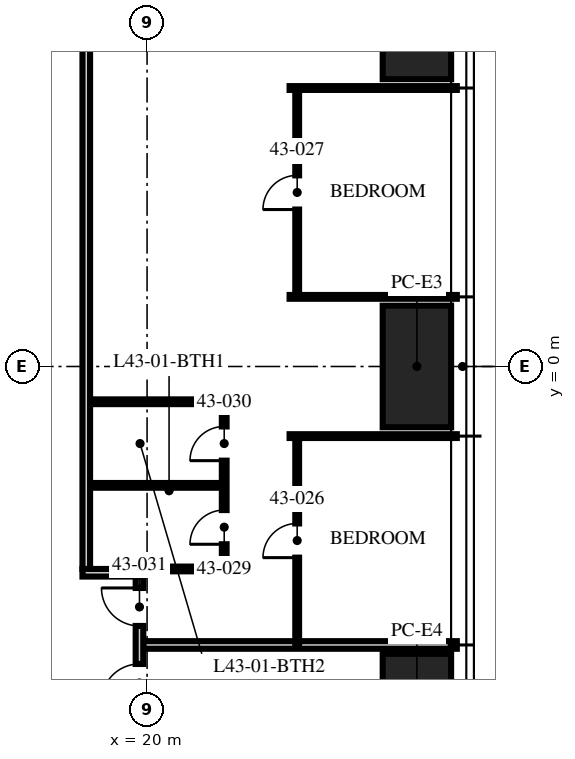
"""IFC4 building model, lengths in metres.
Left out: names, types, materials, properties, quantities, classifications, styles, units other than length and angle.
Written with IfcOpenShell. Run it as: python <this file> out.ifc"""

import sys

from ifc_helpers import new_model, si_unit, direction, frame, frame_2d, origin, origin_2d, place, context, subcontext, project, spatial, rectangle, hollow_rectangle, extrude, element, fill, save


model = new_model("IFC4")
c1 = context("Model", 3, precision=1e-05, world=origin(), true_north=direction((0.0, 1.0)))
c2 = subcontext(c1, "Body", "Model", "MODEL_VIEW")
j1 = project(units=[si_unit("LENGTHUNIT", "METRE"), si_unit("PLANEANGLEUNIT", "RADIAN")], contexts=[c1])
p1 = place(None, origin())
s1 = spatial("IfcSite", under=j1, at=p1, CompositionType="ELEMENT")
p2 = place(p1, origin())
s2 = spatial("IfcBuilding", under=s1, at=p2, CompositionType="ELEMENT")
p3 = place(p2, frame((0.0, 0.0, 171.0)))
s3 = spatial("IfcBuildingStorey", under=s2, at=p3, CompositionType="ELEMENT", Elevation=171.0)
for number, where, z_axis, x_axis in (
    (1, (27.1, 9.16, 0.0), (0.0, 0.0, 1.0), (0.0, 1.0, 0.0)),
    (2, (27.1, 0.0, 0.0), (0.0, 0.0, 1.0), (0.0, 1.0, 0.0)),
    (3, (27.1, -9.16, 0.0), (0.0, 0.0, 1.0), (0.0, 1.0, 0.0)),
):
    element("IfcColumn", number, at=place(p3, frame(where, z_axis=z_axis, x_axis=x_axis)), inside=s3, PredefinedType="COLUMN", context=c2, shape_type="SweptSolid", body=[
        extrude(hollow_rectangle(XDim=3.2, YDim=1.8, WallThickness=0.2, at=origin_2d()), origin(), (0.0, 0.0, 1.0), 3.75),
    ])
p4 = place(p3, frame((19.9, -7.328, 0.0), z_axis=(0.0, 0.0, 1.0), x_axis=(1.0, 0.0, 0.0)))
e4 = element("IfcWall", 4, at=p4, inside=s3, PredefinedType="PARTITIONING", context=c2, shape_type="SweptSolid", body=[
    extrude(rectangle(XDim=8.25, YDim=0.2, at=frame_2d((4.125, 0.0))), origin(), (0.0, 0.0, 1.0), 2.81),
])
for number, where, z_axis, x_axis in (
    (5, (23.75, -1.832, 0.0), (0.0, 0.0, 1.0), (1.0, 0.0, 0.0)),
    (6, (23.75, 1.832, 0.0), (0.0, 0.0, 1.0), (1.0, 0.0, 0.0)),
    (7, (23.75, 7.328, 0.0), (0.0, 0.0, 1.0), (1.0, 0.0, 0.0)),
):
    element("IfcWall", number, at=place(p3, frame(where, z_axis=z_axis, x_axis=x_axis)), inside=s3, PredefinedType="PARTITIONING", context=c2, shape_type="SweptSolid", body=[
        extrude(rectangle(XDim=4.4, YDim=0.1, at=frame_2d((2.2, 0.0))), origin(), (0.0, 0.0, 1.0), 2.81),
    ])
p5 = place(p3, frame((23.95, -7.328, 0.0), z_axis=(0.0, 0.0, 1.0), x_axis=(0.0, 1.0, 0.0)))
e8 = element("IfcWall", 8, at=p5, inside=s3, PredefinedType="PARTITIONING", context=c2, shape_type="SweptSolid", body=[
    extrude(rectangle(XDim=5.496, YDim=0.1, at=frame_2d((2.748, 0.0))), origin(), (0.0, 0.0, 1.0), 2.81),
])
p6 = place(p5, frame((2.298, 0.0, 0.0)))
e9 = element("IfcOpeningElement", 9, at=p6, cuts=e8, PredefinedType="OPENING", context=c2, shape_type="SweptSolid", body=[
    extrude(rectangle(XDim=0.9, YDim=2.1, at=frame_2d((0.45, 1.05))), frame((0.0, 0.06, 0.0), z_axis=(0.0, -1.0, 0.0), x_axis=(1.0, 0.0, 0.0)), (0.0, 0.0, 1.0), 0.12),
])
p7 = place(p3, frame((23.95, 1.832, 0.0), z_axis=(0.0, 0.0, 1.0), x_axis=(0.0, 1.0, 0.0)))
e10 = element("IfcWall", 10, at=p7, inside=s3, PredefinedType="PARTITIONING", context=c2, shape_type="SweptSolid", body=[
    extrude(rectangle(XDim=5.496, YDim=0.1, at=frame_2d((2.748, 0.0))), origin(), (0.0, 0.0, 1.0), 2.81),
])
p8 = place(p7, frame((2.298, 0.0, 0.0)))
e11 = element("IfcOpeningElement", 11, at=p8, cuts=e10, PredefinedType="OPENING", context=c2, shape_type="SweptSolid", body=[
    extrude(rectangle(XDim=0.9, YDim=2.1, at=frame_2d((0.45, 1.05))), frame((0.0, 0.06, 0.0), z_axis=(0.0, -1.0, 0.0), x_axis=(1.0, 0.0, 0.0)), (0.0, 0.0, 1.0), 0.12),
])
p9 = place(p3, frame((22.03, -5.328, 0.0), z_axis=(0.0, 0.0, 1.0), x_axis=(0.0, 1.0, 0.0)))
e12 = element("IfcWall", 12, at=p9, inside=s3, PredefinedType="PARTITIONING", context=c2, shape_type="SweptSolid", body=[
    extrude(rectangle(XDim=4.4, YDim=0.125, at=frame_2d((2.2, 0.0))), origin(), (0.0, 0.0, 1.0), 2.81),
])
p10 = place(p9, frame((0.65, 0.0, 0.0)))
e13 = element("IfcOpeningElement", 13, at=p10, cuts=e12, PredefinedType="OPENING", context=c2, shape_type="SweptSolid", body=[
    extrude(rectangle(XDim=0.9, YDim=2.1, at=frame_2d((0.45, 1.05))), frame((0.0, 0.073, 0.0), z_axis=(0.0, -1.0, 0.0), x_axis=(1.0, 0.0, 0.0)), (0.0, 0.0, 1.0), 0.145),
])
p11 = place(p9, frame((2.85, 0.0, 0.0)))
e14 = element("IfcOpeningElement", 14, at=p11, cuts=e12, PredefinedType="OPENING", context=c2, shape_type="SweptSolid", body=[
    extrude(rectangle(XDim=0.9, YDim=2.1, at=frame_2d((0.45, 1.05))), frame((0.0, 0.073, 0.0), z_axis=(0.0, -1.0, 0.0), x_axis=(1.0, 0.0, 0.0)), (0.0, 0.0, 1.0), 0.145),
])
p12 = place(p3, frame((19.97, -5.328, 0.0), z_axis=(0.0, 0.0, 1.0), x_axis=(1.0, 0.0, 0.0)))
e15 = element("IfcWall", 15, at=p12, inside=s3, PredefinedType="PARTITIONING", context=c2, shape_type="SweptSolid", body=[
    extrude(rectangle(XDim=2.06, YDim=0.125, at=frame_2d((1.03, 0.0))), origin(), (0.0, 0.0, 1.0), 3.5),
])
for number, where, z_axis, x_axis in (
    (16, (18.5, -3.128, 0.0), (0.0, 0.0, 1.0), (1.0, 0.0, 0.0)),
    (17, (18.5, -0.928, 0.0), (0.0, 0.0, 1.0), (1.0, 0.0, 0.0)),
):
    element("IfcWall", number, at=place(p3, frame(where, z_axis=z_axis, x_axis=x_axis)), inside=s3, PredefinedType="PARTITIONING", context=c2, shape_type="SweptSolid", body=[
        extrude(rectangle(XDim=3.53, YDim=0.125, at=frame_2d((1.765, 0.0))), origin(), (0.0, 0.0, 1.0), 3.5),
    ])
p13 = place(p3, frame((18.3, -5.428, 0.0), z_axis=(0.0, 0.0, 1.0), x_axis=(1.0, 0.0, 0.0)))
e18 = element("IfcWall", 18, at=p13, inside=s3, PredefinedType="PARTITIONING", context=c2, shape_type="SweptSolid", body=[
    extrude(rectangle(XDim=1.6, YDim=0.2, at=frame_2d((0.8, 0.0))), origin(), (0.0, 0.0, 1.0), 3.5),
])
p14 = place(p3, frame((19.8, -9.128, 0.0), z_axis=(0.0, 0.0, 1.0), x_axis=(0.0, 1.0, 0.0)))
e19 = element("IfcWall", 19, at=p14, inside=s3, PredefinedType="PARTITIONING", context=c2, shape_type="SweptSolid", body=[
    extrude(rectangle(XDim=3.6, YDim=0.2, at=frame_2d((1.8, 0.0))), origin(), (0.0, 0.0, 1.0), 2.7),
])
p15 = place(p14, frame((2.3, 0.0, 0.0)))
e20 = element("IfcOpeningElement", 20, at=p15, cuts=e19, PredefinedType="OPENING", context=c2, shape_type="SweptSolid", body=[
    extrude(rectangle(XDim=1.0, YDim=2.2, at=frame_2d((0.5, 1.1))), frame((0.0, 0.11, 0.0), z_axis=(0.0, -1.0, 0.0), x_axis=(1.0, 0.0, 0.0)), (0.0, 0.0, 1.0), 0.22),
])
p16 = place(p14, frame((0.3, 0.0, 0.0)))
e21 = element("IfcOpeningElement", 21, at=p16, cuts=e19, PredefinedType="OPENING", context=c2, shape_type="SweptSolid", body=[
    extrude(rectangle(XDim=1.0, YDim=2.2, at=frame_2d((0.5, 1.1))), frame((0.0, 0.11, 0.0), z_axis=(0.0, -1.0, 0.0), x_axis=(1.0, 0.0, 0.0)), (0.0, 0.0, 1.0), 0.22),
])
p17 = place(p3, frame((18.4, -5.328, 0.0), z_axis=(0.0, 0.0, 1.0), x_axis=(0.0, 1.0, 0.0)))
e22 = element("IfcWall", 22, at=p17, inside=s3, PredefinedType="PARTITIONING", context=c2, shape_type="SweptSolid", body=[
    extrude(rectangle(XDim=22.028, YDim=0.2, at=frame_2d((11.014, 0.0))), origin(), (0.0, 0.0, 1.0), 2.7),
])
p18 = place(p6, origin())
e23 = element("IfcDoor", 23, at=p18, inside=s3, OperationType="SINGLE_SWING_LEFT", PredefinedType="DOOR", context=c2, shape_type="SweptSolid", body=[
    extrude(rectangle(XDim=0.9, YDim=2.1, at=frame_2d((0.45, 1.05))), frame((0.0, 0.025, 0.0), z_axis=(0.0, -1.0, 0.0), x_axis=(1.0, 0.0, 0.0)), (0.0, 0.0, 1.0), 0.05),
])
fill(e9, e23)
p19 = place(p8, origin())
e24 = element("IfcDoor", 24, at=p19, inside=s3, OperationType="SINGLE_SWING_LEFT", PredefinedType="DOOR", context=c2, shape_type="SweptSolid", body=[
    extrude(rectangle(XDim=0.9, YDim=2.1, at=frame_2d((0.45, 1.05))), frame((0.0, 0.025, 0.0), z_axis=(0.0, -1.0, 0.0), x_axis=(1.0, 0.0, 0.0)), (0.0, 0.0, 1.0), 0.05),
])
fill(e11, e24)
p20 = place(p10, origin())
e25 = element("IfcDoor", 25, at=p20, inside=s3, OperationType="SINGLE_SWING_LEFT", PredefinedType="DOOR", context=c2, shape_type="SweptSolid", body=[
    extrude(rectangle(XDim=0.9, YDim=2.1, at=frame_2d((0.45, 1.05))), frame((0.0, 0.025, 0.0), z_axis=(0.0, -1.0, 0.0), x_axis=(1.0, 0.0, 0.0)), (0.0, 0.0, 1.0), 0.05),
])
fill(e13, e25)
p21 = place(p11, origin())
e26 = element("IfcDoor", 26, at=p21, inside=s3, OperationType="SINGLE_SWING_LEFT", PredefinedType="DOOR", context=c2, shape_type="SweptSolid", body=[
    extrude(rectangle(XDim=0.9, YDim=2.1, at=frame_2d((0.45, 1.05))), frame((0.0, 0.025, 0.0), z_axis=(0.0, -1.0, 0.0), x_axis=(1.0, 0.0, 0.0)), (0.0, 0.0, 1.0), 0.05),
])
fill(e14, e26)
p22 = place(p15, origin())
e27 = element("IfcDoor", 27, at=p22, inside=s3, OperationType="SINGLE_SWING_RIGHT", PredefinedType="DOOR", context=c2, shape_type="SweptSolid", body=[
    extrude(rectangle(XDim=1.0, YDim=2.2, at=frame_2d((0.5, 1.1))), frame((0.0, 0.025, 0.0), z_axis=(0.0, -1.0, 0.0), x_axis=(1.0, 0.0, 0.0)), (0.0, 0.0, 1.0), 0.05),
])
fill(e20, e27)
p23 = place(p16, origin())
e28 = element("IfcDoor", 28, at=p23, inside=s3, OperationType="SINGLE_SWING_LEFT", PredefinedType="DOOR", context=c2, shape_type="SweptSolid", body=[
    extrude(rectangle(XDim=1.0, YDim=2.2, at=frame_2d((0.5, 1.1))), frame((0.0, 0.025, 0.0), z_axis=(0.0, -1.0, 0.0), x_axis=(1.0, 0.0, 0.0)), (0.0, 0.0, 1.0), 0.05),
])
fill(e21, e28)
save(model, sys.argv[1])
